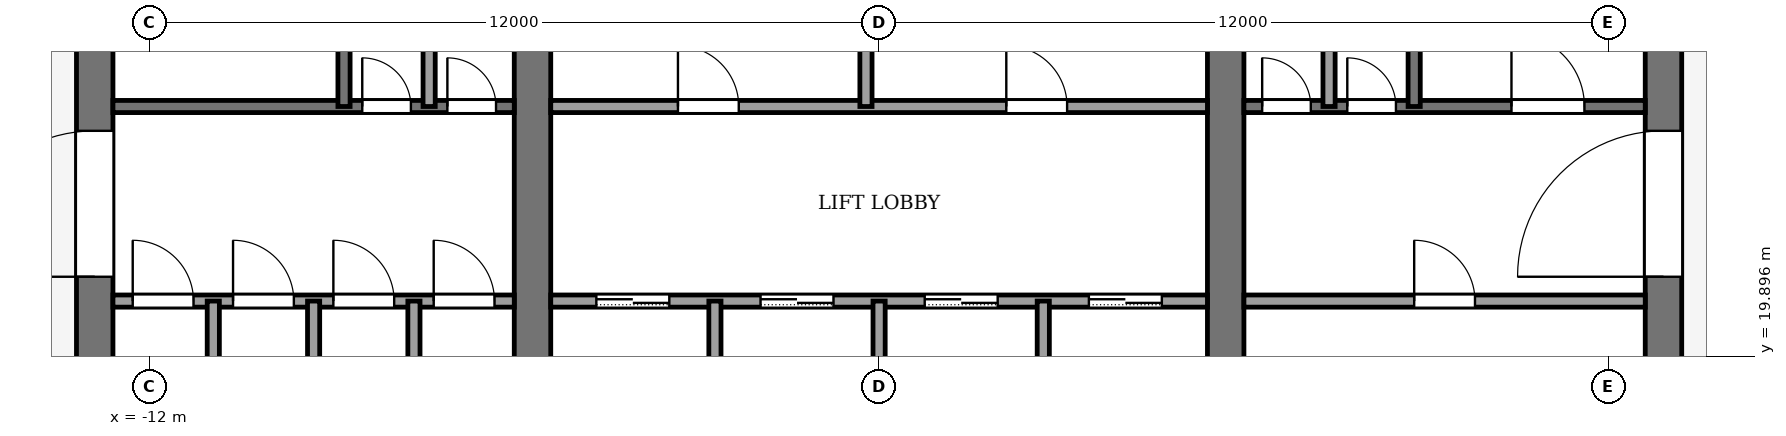
"""IFC4 building model, lengths in metres.
Left out: names, types, materials, properties, quantities, classifications, styles, units other than length and angle.
Written with IfcOpenShell. Run it as: python <this file> out.ifc"""

import sys

from ifc_helpers import new_model, si_unit, direction, frame, frame_2d, origin, place, context, subcontext, project, spatial, rectangle, extrude, element, fill, save


model = new_model("IFC4")
c1 = context("Model", 3, precision=1e-05, world=origin(), true_north=direction((0.0, 1.0)))
c2 = subcontext(c1, "Body", "Model", "MODEL_VIEW")
j1 = project(units=[si_unit("LENGTHUNIT", "METRE"), si_unit("PLANEANGLEUNIT", "RADIAN")], contexts=[c1])
p1 = place(None, origin())
s1 = spatial("IfcSite", under=j1, at=p1, CompositionType="ELEMENT")
p2 = place(p1, origin())
s2 = spatial("IfcBuilding", under=s1, at=p2, CompositionType="ELEMENT")
p3 = place(p2, frame((0.0, 0.0, 298.0)))
s3 = spatial("IfcBuildingStorey", under=s2, at=p3, CompositionType="ELEMENT", Elevation=298.0)
p4 = place(p3, frame((-12.9, 18.4, -0.13), z_axis=(0.0, 0.0, 1.0), x_axis=(0.0, 1.0, 0.0)))
e1 = element("IfcWall", 1, at=p4, inside=s3, PredefinedType="SHEAR", context=c2, shape_type="SweptSolid", body=[
    extrude(rectangle(XDim=19.2, YDim=0.6, at=frame_2d((9.6, 0.0))), origin(), (0.0, 0.0, 1.0), 4.0),
])
p5 = place(p4, frame((2.8, 0.0, 0.13)))
e2 = element("IfcOpeningElement", 2, at=p5, cuts=e1, PredefinedType="OPENING", context=c2, shape_type="SweptSolid", body=[
    extrude(rectangle(XDim=2.4, YDim=2.4, at=frame_2d((1.2, 1.2))), frame((0.0, 0.31, 0.0), z_axis=(0.0, -1.0, 0.0), x_axis=(1.0, 0.0, 0.0)), (0.0, 0.0, 1.0), 0.62),
])
p6 = place(p4, frame((13.4, 0.0, 0.13)))
e3 = element("IfcOpeningElement", 3, at=p6, cuts=e1, PredefinedType="OPENING", context=c2, shape_type="SweptSolid", body=[
    extrude(rectangle(XDim=1.4, YDim=2.2, at=frame_2d((0.7, 1.1))), frame((0.0, 0.31, 0.0), z_axis=(0.0, -1.0, 0.0), x_axis=(1.0, 0.0, 0.0)), (0.0, 0.0, 1.0), 0.62),
])
p7 = place(p3, frame((12.9, 18.4, -0.13), z_axis=(0.0, 0.0, 1.0), x_axis=(0.0, 1.0, 0.0)))
e4 = element("IfcWall", 4, at=p7, inside=s3, PredefinedType="SHEAR", context=c2, shape_type="SweptSolid", body=[
    extrude(rectangle(XDim=19.2, YDim=0.6, at=frame_2d((9.6, 0.0))), origin(), (0.0, 0.0, 1.0), 4.0),
])
p8 = place(p7, frame((2.8, 0.0, 0.13)))
e5 = element("IfcOpeningElement", 5, at=p8, cuts=e4, PredefinedType="OPENING", context=c2, shape_type="SweptSolid", body=[
    extrude(rectangle(XDim=2.4, YDim=2.4, at=frame_2d((1.2, 1.2))), frame((0.0, 0.31, 0.0), z_axis=(0.0, -1.0, 0.0), x_axis=(1.0, 0.0, 0.0)), (0.0, 0.0, 1.0), 0.62),
])
p9 = place(p7, frame((13.3, 0.0, 0.13)))
e6 = element("IfcOpeningElement", 6, at=p9, cuts=e4, PredefinedType="OPENING", context=c2, shape_type="SweptSolid", body=[
    extrude(rectangle(XDim=2.4, YDim=2.4, at=frame_2d((1.2, 1.2))), frame((0.0, 0.31, 0.0), z_axis=(0.0, -1.0, 0.0), x_axis=(1.0, 0.0, 0.0)), (0.0, 0.0, 1.0), 0.62),
])
p10 = place(p3, frame((-5.7, 18.4, -0.13), z_axis=(0.0, 0.0, 1.0), x_axis=(0.0, 1.0, 0.0)))
e7 = element("IfcWall", 7, at=p10, inside=s3, PredefinedType="SHEAR", context=c2, shape_type="SweptSolid", body=[
    extrude(rectangle(XDim=19.2, YDim=0.6, at=frame_2d((9.6, 0.0))), origin(), (0.0, 0.0, 1.0), 4.0),
])
p11 = place(p10, frame((8.35, 0.0, 0.13)))
e8 = element("IfcOpeningElement", 8, at=p11, cuts=e7, PredefinedType="OPENING", context=c2, shape_type="SweptSolid", body=[
    extrude(rectangle(XDim=0.9, YDim=2.1, at=frame_2d((0.45, 1.05))), frame((0.0, 0.31, 0.0), z_axis=(0.0, -1.0, 0.0), x_axis=(1.0, 0.0, 0.0)), (0.0, 0.0, 1.0), 0.62),
])
p12 = place(p3, frame((5.7, 18.4, -0.13), z_axis=(0.0, 0.0, 1.0), x_axis=(0.0, 1.0, 0.0)))
e9 = element("IfcWall", 9, at=p12, inside=s3, PredefinedType="SHEAR", context=c2, shape_type="SweptSolid", body=[
    extrude(rectangle(XDim=19.2, YDim=0.6, at=frame_2d((9.6, 0.0))), origin(), (0.0, 0.0, 1.0), 4.0),
])
p13 = place(p12, frame((8.35, 0.0, 0.13)))
e10 = element("IfcOpeningElement", 10, at=p13, cuts=e9, PredefinedType="OPENING", context=c2, shape_type="SweptSolid", body=[
    extrude(rectangle(XDim=0.9, YDim=2.1, at=frame_2d((0.45, 1.05))), frame((0.0, 0.31, 0.0), z_axis=(0.0, -1.0, 0.0), x_axis=(1.0, 0.0, 0.0)), (0.0, 0.0, 1.0), 0.62),
])
p14 = place(p12, frame((13.3, 0.0, 0.13)))
e11 = element("IfcOpeningElement", 11, at=p14, cuts=e9, PredefinedType="OPENING", context=c2, shape_type="SweptSolid", body=[
    extrude(rectangle(XDim=2.4, YDim=2.4, at=frame_2d((1.2, 1.2))), frame((0.0, 0.31, 0.0), z_axis=(0.0, -1.0, 0.0), x_axis=(1.0, 0.0, 0.0)), (0.0, 0.0, 1.0), 0.62),
])
p15 = place(p3, frame((-12.6, 20.8, 0.0), z_axis=(0.0, 0.0, 1.0), x_axis=(1.0, 0.0, 0.0)))
e12 = element("IfcWall", 12, at=p15, inside=s3, PredefinedType="PARTITIONING", context=c2, shape_type="SweptSolid", body=[
    extrude(rectangle(XDim=6.6, YDim=0.2, at=frame_2d((3.3, 0.0))), origin(), (0.0, 0.0, 1.0), 3.87),
])
p16 = place(p15, frame((0.325, 0.0, 0.0)))
e13 = element("IfcOpeningElement", 13, at=p16, cuts=e12, PredefinedType="OPENING", context=c2, shape_type="SweptSolid", body=[
    extrude(rectangle(XDim=1.0, YDim=2.1, at=frame_2d((0.5, 1.05))), frame((0.0, 0.11, 0.0), z_axis=(0.0, -1.0, 0.0), x_axis=(1.0, 0.0, 0.0)), (0.0, 0.0, 1.0), 0.22),
])
p17 = place(p15, frame((1.975, 0.0, 0.0)))
e14 = element("IfcOpeningElement", 14, at=p17, cuts=e12, PredefinedType="OPENING", context=c2, shape_type="SweptSolid", body=[
    extrude(rectangle(XDim=1.0, YDim=2.1, at=frame_2d((0.5, 1.05))), frame((0.0, 0.11, 0.0), z_axis=(0.0, -1.0, 0.0), x_axis=(1.0, 0.0, 0.0)), (0.0, 0.0, 1.0), 0.22),
])
p18 = place(p15, frame((3.625, 0.0, 0.0)))
e15 = element("IfcOpeningElement", 15, at=p18, cuts=e12, PredefinedType="OPENING", context=c2, shape_type="SweptSolid", body=[
    extrude(rectangle(XDim=1.0, YDim=2.1, at=frame_2d((0.5, 1.05))), frame((0.0, 0.11, 0.0), z_axis=(0.0, -1.0, 0.0), x_axis=(1.0, 0.0, 0.0)), (0.0, 0.0, 1.0), 0.22),
])
p19 = place(p15, frame((5.275, 0.0, 0.0)))
e16 = element("IfcOpeningElement", 16, at=p19, cuts=e12, PredefinedType="OPENING", context=c2, shape_type="SweptSolid", body=[
    extrude(rectangle(XDim=1.0, YDim=2.1, at=frame_2d((0.5, 1.05))), frame((0.0, 0.11, 0.0), z_axis=(0.0, -1.0, 0.0), x_axis=(1.0, 0.0, 0.0)), (0.0, 0.0, 1.0), 0.22),
])
p20 = place(p3, frame((-5.4, 20.8, 0.0), z_axis=(0.0, 0.0, 1.0), x_axis=(1.0, 0.0, 0.0)))
e17 = element("IfcWall", 17, at=p20, inside=s3, PredefinedType="PARTITIONING", context=c2, shape_type="SweptSolid", body=[
    extrude(rectangle(XDim=10.8, YDim=0.2, at=frame_2d((5.4, 0.0))), origin(), (0.0, 0.0, 1.0), 3.87),
])
p21 = place(p20, frame((0.75, 0.0, 0.0)))
e18 = element("IfcOpeningElement", 18, at=p21, cuts=e17, PredefinedType="OPENING", context=c2, shape_type="SweptSolid", body=[
    extrude(rectangle(XDim=1.2, YDim=2.2, at=frame_2d((0.6, 1.1))), frame((0.0, 0.11, 0.0), z_axis=(0.0, -1.0, 0.0), x_axis=(1.0, 0.0, 0.0)), (0.0, 0.0, 1.0), 0.22),
])
p22 = place(p20, frame((3.45, 0.0, 0.0)))
e19 = element("IfcOpeningElement", 19, at=p22, cuts=e17, PredefinedType="OPENING", context=c2, shape_type="SweptSolid", body=[
    extrude(rectangle(XDim=1.2, YDim=2.2, at=frame_2d((0.6, 1.1))), frame((0.0, 0.11, 0.0), z_axis=(0.0, -1.0, 0.0), x_axis=(1.0, 0.0, 0.0)), (0.0, 0.0, 1.0), 0.22),
])
p23 = place(p20, frame((6.15, 0.0, 0.0)))
e20 = element("IfcOpeningElement", 20, at=p23, cuts=e17, PredefinedType="OPENING", context=c2, shape_type="SweptSolid", body=[
    extrude(rectangle(XDim=1.2, YDim=2.2, at=frame_2d((0.6, 1.1))), frame((0.0, 0.11, 0.0), z_axis=(0.0, -1.0, 0.0), x_axis=(1.0, 0.0, 0.0)), (0.0, 0.0, 1.0), 0.22),
])
p24 = place(p20, frame((8.85, 0.0, 0.0)))
e21 = element("IfcOpeningElement", 21, at=p24, cuts=e17, PredefinedType="OPENING", context=c2, shape_type="SweptSolid", body=[
    extrude(rectangle(XDim=1.2, YDim=2.2, at=frame_2d((0.6, 1.1))), frame((0.0, 0.11, 0.0), z_axis=(0.0, -1.0, 0.0), x_axis=(1.0, 0.0, 0.0)), (0.0, 0.0, 1.0), 0.22),
])
p25 = place(p3, frame((6.0, 20.8, 0.0), z_axis=(0.0, 0.0, 1.0), x_axis=(1.0, 0.0, 0.0)))
e22 = element("IfcWall", 22, at=p25, inside=s3, PredefinedType="PARTITIONING", context=c2, shape_type="SweptSolid", body=[
    extrude(rectangle(XDim=6.6, YDim=0.2, at=frame_2d((3.3, 0.0))), origin(), (0.0, 0.0, 1.0), 3.87),
])
p26 = place(p25, frame((2.8, 0.0, 0.0)))
e23 = element("IfcOpeningElement", 23, at=p26, cuts=e22, PredefinedType="OPENING", context=c2, shape_type="SweptSolid", body=[
    extrude(rectangle(XDim=1.0, YDim=2.1, at=frame_2d((0.5, 1.05))), frame((0.0, 0.11, 0.0), z_axis=(0.0, -1.0, 0.0), x_axis=(1.0, 0.0, 0.0)), (0.0, 0.0, 1.0), 0.22),
])
p27 = place(p3, frame((-12.6, 24.0, 0.0), z_axis=(0.0, 0.0, 1.0), x_axis=(1.0, 0.0, 0.0)))
e24 = element("IfcWall", 24, at=p27, inside=s3, PredefinedType="PARTITIONING", context=c2, shape_type="SweptSolid", body=[
    extrude(rectangle(XDim=6.6, YDim=0.2, at=frame_2d((3.3, 0.0))), origin(), (0.0, 0.0, 1.0), 3.87),
])
p28 = place(p27, frame((4.1, 0.0, 0.0)))
e25 = element("IfcOpeningElement", 25, at=p28, cuts=e24, PredefinedType="OPENING", context=c2, shape_type="SweptSolid", body=[
    extrude(rectangle(XDim=0.8, YDim=2.1, at=frame_2d((0.4, 1.05))), frame((0.0, 0.11, 0.0), z_axis=(0.0, -1.0, 0.0), x_axis=(1.0, 0.0, 0.0)), (0.0, 0.0, 1.0), 0.22),
])
p29 = place(p27, frame((5.5, 0.0, 0.0)))
e26 = element("IfcOpeningElement", 26, at=p29, cuts=e24, PredefinedType="OPENING", context=c2, shape_type="SweptSolid", body=[
    extrude(rectangle(XDim=0.8, YDim=2.1, at=frame_2d((0.4, 1.05))), frame((0.0, 0.11, 0.0), z_axis=(0.0, -1.0, 0.0), x_axis=(1.0, 0.0, 0.0)), (0.0, 0.0, 1.0), 0.22),
])
p30 = place(p3, frame((-5.4, 24.0, 0.0), z_axis=(0.0, 0.0, 1.0), x_axis=(1.0, 0.0, 0.0)))
e27 = element("IfcWall", 27, at=p30, inside=s3, PredefinedType="PARTITIONING", context=c2, shape_type="SweptSolid", body=[
    extrude(rectangle(XDim=10.8, YDim=0.2, at=frame_2d((5.4, 0.0))), origin(), (0.0, 0.0, 1.0), 3.87),
])
p31 = place(p30, frame((2.092, 0.0, 0.0)))
e28 = element("IfcOpeningElement", 28, at=p31, cuts=e27, PredefinedType="OPENING", context=c2, shape_type="SweptSolid", body=[
    extrude(rectangle(XDim=1.0, YDim=2.1, at=frame_2d((0.5, 1.05))), frame((0.0, 0.11, 0.0), z_axis=(0.0, -1.0, 0.0), x_axis=(1.0, 0.0, 0.0)), (0.0, 0.0, 1.0), 0.22),
])
p32 = place(p30, frame((7.492, 0.0, 0.0)))
e29 = element("IfcOpeningElement", 29, at=p32, cuts=e27, PredefinedType="OPENING", context=c2, shape_type="SweptSolid", body=[
    extrude(rectangle(XDim=1.0, YDim=2.1, at=frame_2d((0.5, 1.05))), frame((0.0, 0.11, 0.0), z_axis=(0.0, -1.0, 0.0), x_axis=(1.0, 0.0, 0.0)), (0.0, 0.0, 1.0), 0.22),
])
p33 = place(p3, frame((6.0, 24.0, 0.0), z_axis=(0.0, 0.0, 1.0), x_axis=(1.0, 0.0, 0.0)))
e30 = element("IfcWall", 30, at=p33, inside=s3, PredefinedType="PARTITIONING", context=c2, shape_type="SweptSolid", body=[
    extrude(rectangle(XDim=6.6, YDim=0.2, at=frame_2d((3.3, 0.0))), origin(), (0.0, 0.0, 1.0), 3.87),
])
p34 = place(p33, frame((0.3, 0.0, 0.0)))
e31 = element("IfcOpeningElement", 31, at=p34, cuts=e30, PredefinedType="OPENING", context=c2, shape_type="SweptSolid", body=[
    extrude(rectangle(XDim=0.8, YDim=2.1, at=frame_2d((0.4, 1.05))), frame((0.0, 0.11, 0.0), z_axis=(0.0, -1.0, 0.0), x_axis=(1.0, 0.0, 0.0)), (0.0, 0.0, 1.0), 0.22),
])
p35 = place(p33, frame((1.7, 0.0, 0.0)))
e32 = element("IfcOpeningElement", 32, at=p35, cuts=e30, PredefinedType="OPENING", context=c2, shape_type="SweptSolid", body=[
    extrude(rectangle(XDim=0.8, YDim=2.1, at=frame_2d((0.4, 1.05))), frame((0.0, 0.11, 0.0), z_axis=(0.0, -1.0, 0.0), x_axis=(1.0, 0.0, 0.0)), (0.0, 0.0, 1.0), 0.22),
])
p36 = place(p33, frame((4.4, 0.0, 0.0)))
e33 = element("IfcOpeningElement", 33, at=p36, cuts=e30, PredefinedType="OPENING", context=c2, shape_type="SweptSolid", body=[
    extrude(rectangle(XDim=1.2, YDim=2.2, at=frame_2d((0.6, 1.1))), frame((0.0, 0.11, 0.0), z_axis=(0.0, -1.0, 0.0), x_axis=(1.0, 0.0, 0.0)), (0.0, 0.0, 1.0), 0.22),
])
for number, where, z_axis, x_axis in (
    (34, (-10.95, 18.4, 0.0), (0.0, 0.0, 1.0), (0.0, 1.0, 0.0)),
    (35, (-9.3, 18.4, 0.0), (0.0, 0.0, 1.0), (0.0, 1.0, 0.0)),
):
    element("IfcWall", number, at=place(p3, frame(where, z_axis=z_axis, x_axis=x_axis)), inside=s3, PredefinedType="PARTITIONING", context=c2, shape_type="SweptSolid", body=[
        extrude(rectangle(XDim=2.4, YDim=0.2, at=frame_2d((1.2, 0.0))), origin(), (0.0, 0.0, 1.0), 3.87),
    ])
p37 = place(p3, frame((-8.8, 24.0, 0.0), z_axis=(0.0, 0.0, 1.0), x_axis=(0.0, 1.0, 0.0)))
e36 = element("IfcWall", 36, at=p37, inside=s3, PredefinedType="PARTITIONING", context=c2, shape_type="SweptSolid", body=[
    extrude(rectangle(XDim=7.4, YDim=0.2, at=frame_2d((3.7, 0.0))), origin(), (0.0, 0.0, 1.0), 3.87),
])
p38 = place(p3, frame((-7.65, 18.4, 0.0), z_axis=(0.0, 0.0, 1.0), x_axis=(0.0, 1.0, 0.0)))
e37 = element("IfcWall", 37, at=p38, inside=s3, PredefinedType="PARTITIONING", context=c2, shape_type="SweptSolid", body=[
    extrude(rectangle(XDim=2.4, YDim=0.2, at=frame_2d((1.2, 0.0))), origin(), (0.0, 0.0, 1.0), 3.87),
])
p39 = place(p3, frame((-7.4, 24.0, 0.0), z_axis=(0.0, 0.0, 1.0), x_axis=(0.0, 1.0, 0.0)))
e38 = element("IfcWall", 38, at=p39, inside=s3, PredefinedType="PARTITIONING", context=c2, shape_type="SweptSolid", body=[
    extrude(rectangle(XDim=7.4, YDim=0.2, at=frame_2d((3.7, 0.0))), origin(), (0.0, 0.0, 1.0), 3.87),
])
p40 = place(p3, frame((-2.7, 18.4, 0.0), z_axis=(0.0, 0.0, 1.0), x_axis=(0.0, 1.0, 0.0)))
e39 = element("IfcWall", 39, at=p40, inside=s3, PredefinedType="PARTITIONING", context=c2, shape_type="SweptSolid", body=[
    extrude(rectangle(XDim=2.4, YDim=0.2, at=frame_2d((1.2, 0.0))), origin(), (0.0, 0.0, 1.0), 3.87),
])
p41 = place(p3, frame((-0.216, 24.0, 0.0), z_axis=(0.0, 0.0, 1.0), x_axis=(0.0, 1.0, 0.0)))
e40 = element("IfcWall", 40, at=p41, inside=s3, PredefinedType="PARTITIONING", context=c2, shape_type="SweptSolid", body=[
    extrude(rectangle(XDim=2.4, YDim=0.2, at=frame_2d((1.2, 0.0))), origin(), (0.0, 0.0, 1.0), 3.87),
])
for number, where, z_axis, x_axis in (
    (41, (0.0, 18.4, 0.0), (0.0, 0.0, 1.0), (0.0, 1.0, 0.0)),
    (42, (2.7, 18.4, 0.0), (0.0, 0.0, 1.0), (0.0, 1.0, 0.0)),
):
    element("IfcWall", number, at=place(p3, frame(where, z_axis=z_axis, x_axis=x_axis)), inside=s3, PredefinedType="PARTITIONING", context=c2, shape_type="SweptSolid", body=[
        extrude(rectangle(XDim=2.4, YDim=0.2, at=frame_2d((1.2, 0.0))), origin(), (0.0, 0.0, 1.0), 3.87),
    ])
for number, where, z_axis, x_axis in (
    (43, (7.4, 24.0, 0.0), (0.0, 0.0, 1.0), (0.0, 1.0, 0.0)),
    (44, (8.8, 24.0, 0.0), (0.0, 0.0, 1.0), (0.0, 1.0, 0.0)),
):
    element("IfcWall", number, at=place(p3, frame(where, z_axis=z_axis, x_axis=x_axis)), inside=s3, PredefinedType="PARTITIONING", context=c2, shape_type="SweptSolid", body=[
        extrude(rectangle(XDim=7.4, YDim=0.2, at=frame_2d((3.7, 0.0))), origin(), (0.0, 0.0, 1.0), 3.87),
    ])
p42 = place(p21, origin())
e45 = element("IfcDoor", 45, at=p42, inside=s3, OperationType="SLIDING_TO_LEFT", PredefinedType="DOOR", context=c2, shape_type="SweptSolid", body=[
    extrude(rectangle(XDim=1.2, YDim=2.2, at=frame_2d((0.6, 1.1))), frame((0.0, 0.025, 0.0), z_axis=(0.0, -1.0, 0.0), x_axis=(1.0, 0.0, 0.0)), (0.0, 0.0, 1.0), 0.05),
])
fill(e18, e45)
p43 = place(p22, origin())
e46 = element("IfcDoor", 46, at=p43, inside=s3, OperationType="SLIDING_TO_LEFT", PredefinedType="DOOR", context=c2, shape_type="SweptSolid", body=[
    extrude(rectangle(XDim=1.2, YDim=2.2, at=frame_2d((0.6, 1.1))), frame((0.0, 0.025, 0.0), z_axis=(0.0, -1.0, 0.0), x_axis=(1.0, 0.0, 0.0)), (0.0, 0.0, 1.0), 0.05),
])
fill(e19, e46)
p44 = place(p23, origin())
e47 = element("IfcDoor", 47, at=p44, inside=s3, OperationType="SLIDING_TO_LEFT", PredefinedType="DOOR", context=c2, shape_type="SweptSolid", body=[
    extrude(rectangle(XDim=1.2, YDim=2.2, at=frame_2d((0.6, 1.1))), frame((0.0, 0.025, 0.0), z_axis=(0.0, -1.0, 0.0), x_axis=(1.0, 0.0, 0.0)), (0.0, 0.0, 1.0), 0.05),
])
fill(e20, e47)
p45 = place(p24, origin())
e48 = element("IfcDoor", 48, at=p45, inside=s3, OperationType="SLIDING_TO_LEFT", PredefinedType="DOOR", context=c2, shape_type="SweptSolid", body=[
    extrude(rectangle(XDim=1.2, YDim=2.2, at=frame_2d((0.6, 1.1))), frame((0.0, 0.025, 0.0), z_axis=(0.0, -1.0, 0.0), x_axis=(1.0, 0.0, 0.0)), (0.0, 0.0, 1.0), 0.05),
])
fill(e21, e48)
p46 = place(p31, origin())
e49 = element("IfcDoor", 49, at=p46, inside=s3, OperationType="SINGLE_SWING_RIGHT", PredefinedType="DOOR", context=c2, shape_type="SweptSolid", body=[
    extrude(rectangle(XDim=1.0, YDim=2.1, at=frame_2d((0.5, 1.05))), frame((0.0, 0.025, 0.0), z_axis=(0.0, -1.0, 0.0), x_axis=(1.0, 0.0, 0.0)), (0.0, 0.0, 1.0), 0.05),
])
fill(e28, e49)
p47 = place(p32, origin())
e50 = element("IfcDoor", 50, at=p47, inside=s3, OperationType="SINGLE_SWING_LEFT", PredefinedType="DOOR", context=c2, shape_type="SweptSolid", body=[
    extrude(rectangle(XDim=1.0, YDim=2.1, at=frame_2d((0.5, 1.05))), frame((0.0, 0.025, 0.0), z_axis=(0.0, -1.0, 0.0), x_axis=(1.0, 0.0, 0.0)), (0.0, 0.0, 1.0), 0.05),
])
fill(e29, e50)
p48 = place(p16, origin())
e51 = element("IfcDoor", 51, at=p48, inside=s3, OperationType="SINGLE_SWING_RIGHT", PredefinedType="DOOR", context=c2, shape_type="SweptSolid", body=[
    extrude(rectangle(XDim=1.0, YDim=2.1, at=frame_2d((0.5, 1.05))), frame((0.0, 0.025, 0.0), z_axis=(0.0, -1.0, 0.0), x_axis=(1.0, 0.0, 0.0)), (0.0, 0.0, 1.0), 0.05),
])
fill(e13, e51)
p49 = place(p17, origin())
e52 = element("IfcDoor", 52, at=p49, inside=s3, OperationType="SINGLE_SWING_RIGHT", PredefinedType="DOOR", context=c2, shape_type="SweptSolid", body=[
    extrude(rectangle(XDim=1.0, YDim=2.1, at=frame_2d((0.5, 1.05))), frame((0.0, 0.025, 0.0), z_axis=(0.0, -1.0, 0.0), x_axis=(1.0, 0.0, 0.0)), (0.0, 0.0, 1.0), 0.05),
])
fill(e14, e52)
p50 = place(p18, origin())
e53 = element("IfcDoor", 53, at=p50, inside=s3, OperationType="SINGLE_SWING_LEFT", PredefinedType="DOOR", context=c2, shape_type="SweptSolid", body=[
    extrude(rectangle(XDim=1.0, YDim=2.1, at=frame_2d((0.5, 1.05))), frame((0.0, 0.025, 0.0), z_axis=(0.0, -1.0, 0.0), x_axis=(1.0, 0.0, 0.0)), (0.0, 0.0, 1.0), 0.05),
])
fill(e15, e53)
p51 = place(p19, origin())
e54 = element("IfcDoor", 54, at=p51, inside=s3, OperationType="SINGLE_SWING_LEFT", PredefinedType="DOOR", context=c2, shape_type="SweptSolid", body=[
    extrude(rectangle(XDim=1.0, YDim=2.1, at=frame_2d((0.5, 1.05))), frame((0.0, 0.025, 0.0), z_axis=(0.0, -1.0, 0.0), x_axis=(1.0, 0.0, 0.0)), (0.0, 0.0, 1.0), 0.05),
])
fill(e16, e54)
p52 = place(p26, origin())
e55 = element("IfcDoor", 55, at=p52, inside=s3, OperationType="SINGLE_SWING_LEFT", PredefinedType="DOOR", context=c2, shape_type="SweptSolid", body=[
    extrude(rectangle(XDim=1.0, YDim=2.1, at=frame_2d((0.5, 1.05))), frame((0.0, 0.025, 0.0), z_axis=(0.0, -1.0, 0.0), x_axis=(1.0, 0.0, 0.0)), (0.0, 0.0, 1.0), 0.05),
])
fill(e23, e55)
p53 = place(p28, origin())
e56 = element("IfcDoor", 56, at=p53, inside=s3, OperationType="SINGLE_SWING_RIGHT", PredefinedType="DOOR", context=c2, shape_type="SweptSolid", body=[
    extrude(rectangle(XDim=0.8, YDim=2.1, at=frame_2d((0.4, 1.05))), frame((0.0, 0.025, 0.0), z_axis=(0.0, -1.0, 0.0), x_axis=(1.0, 0.0, 0.0)), (0.0, 0.0, 1.0), 0.05),
])
fill(e25, e56)
p54 = place(p29, origin())
e57 = element("IfcDoor", 57, at=p54, inside=s3, OperationType="SINGLE_SWING_LEFT", PredefinedType="DOOR", context=c2, shape_type="SweptSolid", body=[
    extrude(rectangle(XDim=0.8, YDim=2.1, at=frame_2d((0.4, 1.05))), frame((0.0, 0.025, 0.0), z_axis=(0.0, -1.0, 0.0), x_axis=(1.0, 0.0, 0.0)), (0.0, 0.0, 1.0), 0.05),
])
fill(e26, e57)
p55 = place(p34, origin())
e58 = element("IfcDoor", 58, at=p55, inside=s3, OperationType="SINGLE_SWING_RIGHT", PredefinedType="DOOR", context=c2, shape_type="SweptSolid", body=[
    extrude(rectangle(XDim=0.8, YDim=2.1, at=frame_2d((0.4, 1.05))), frame((0.0, 0.025, 0.0), z_axis=(0.0, -1.0, 0.0), x_axis=(1.0, 0.0, 0.0)), (0.0, 0.0, 1.0), 0.05),
])
fill(e31, e58)
p56 = place(p35, origin())
e59 = element("IfcDoor", 59, at=p56, inside=s3, OperationType="SINGLE_SWING_LEFT", PredefinedType="DOOR", context=c2, shape_type="SweptSolid", body=[
    extrude(rectangle(XDim=0.8, YDim=2.1, at=frame_2d((0.4, 1.05))), frame((0.0, 0.025, 0.0), z_axis=(0.0, -1.0, 0.0), x_axis=(1.0, 0.0, 0.0)), (0.0, 0.0, 1.0), 0.05),
])
fill(e32, e59)
p57 = place(p36, origin())
e60 = element("IfcDoor", 60, at=p57, inside=s3, OperationType="SINGLE_SWING_LEFT", PredefinedType="DOOR", context=c2, shape_type="SweptSolid", body=[
    extrude(rectangle(XDim=1.2, YDim=2.2, at=frame_2d((0.6, 1.1))), frame((0.0, 0.025, 0.0), z_axis=(0.0, -1.0, 0.0), x_axis=(1.0, 0.0, 0.0)), (0.0, 0.0, 1.0), 0.05),
])
fill(e33, e60)
p58 = place(p5, origin())
e61 = element("IfcDoor", 61, at=p58, inside=s3, OperationType="DOUBLE_DOOR_SINGLE_SWING", PredefinedType="DOOR", context=c2, shape_type="SweptSolid", body=[
    extrude(rectangle(XDim=2.4, YDim=2.4, at=frame_2d((1.2, 1.2))), frame((0.0, 0.025, 0.0), z_axis=(0.0, -1.0, 0.0), x_axis=(1.0, 0.0, 0.0)), (0.0, 0.0, 1.0), 0.05),
])
fill(e2, e61)
p59 = place(p8, origin())
e62 = element("IfcDoor", 62, at=p59, inside=s3, OperationType="DOUBLE_DOOR_SINGLE_SWING", PredefinedType="DOOR", context=c2, shape_type="SweptSolid", body=[
    extrude(rectangle(XDim=2.4, YDim=2.4, at=frame_2d((1.2, 1.2))), frame((0.0, 0.025, 0.0), z_axis=(0.0, -1.0, 0.0), x_axis=(1.0, 0.0, 0.0)), (0.0, 0.0, 1.0), 0.05),
])
fill(e5, e62)
save(model, sys.argv[1])
